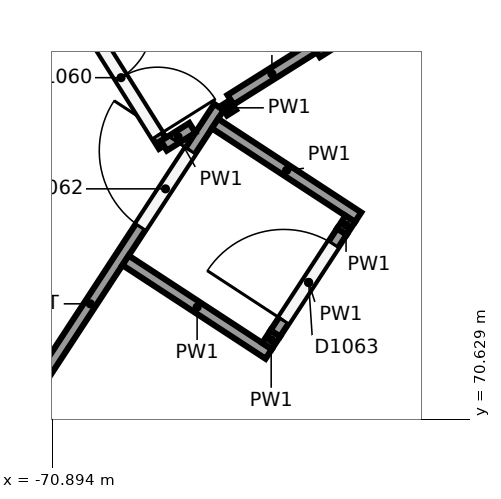
"""IFC4 building model, lengths in metres.
Left out: names, types, materials, properties, quantities, classifications, styles, units other than length and angle.
Written with IfcOpenShell. Run it as: python <this file> out.ifc"""

import sys

from ifc_helpers import new_model, si_unit, direction, frame, frame_2d, origin, place, context, subcontext, project, spatial, rectangle, extrude, element, fill, save


model = new_model("IFC4")
c1 = context("Model", 3, precision=1e-05, world=origin(), true_north=direction((0.0, 1.0)))
c2 = subcontext(c1, "Body", "Model", "MODEL_VIEW")
j1 = project(units=[si_unit("LENGTHUNIT", "METRE"), si_unit("PLANEANGLEUNIT", "RADIAN")], contexts=[c1])
p1 = place(None, origin())
s1 = spatial("IfcSite", under=j1, at=p1, CompositionType="ELEMENT")
p2 = place(p1, origin())
s2 = spatial("IfcBuilding", under=s1, at=p2, CompositionType="ELEMENT")
p3 = place(p2, frame((0.0, 0.0, 12.0)))
s3 = spatial("IfcBuildingStorey", under=s2, at=p3, CompositionType="ELEMENT", Elevation=12.0)
p4 = place(p3, frame((-72.085, 69.559, 0.0), z_axis=(0.0, 0.0, 1.0), x_axis=(0.547328054804, 0.836918156348, 0.0)))
e1 = element("IfcWall", 1, at=p4, inside=s3, PredefinedType="PARTITIONING", context=c2, shape_type="SweptSolid", body=[
    extrude(rectangle(XDim=6.186, YDim=0.15, at=frame_2d((3.093, 0.0))), origin(), (0.0, 0.0, 1.0), 4.026),
])
p5 = place(p4, frame((4.3, 0.0, 0.0)))
e2 = element("IfcOpeningElement", 2, at=p5, cuts=e1, PredefinedType="OPENING", context=c2, shape_type="SweptSolid", body=[
    extrude(rectangle(XDim=1.2, YDim=2.1, at=frame_2d((0.6, 1.05))), frame((0.0, 0.085, 0.0), z_axis=(0.0, -1.0, 0.0), x_axis=(1.0, 0.0, 0.0)), (0.0, 0.0, 1.0), 0.17),
])
p6 = place(p3, frame((-68.548, 74.832, 0.0), z_axis=(0.0, 0.0, 1.0), x_axis=(0.846736781525, 0.53201205138, 0.0)))
e3 = element("IfcWall", 3, at=p6, inside=s3, PredefinedType="PARTITIONING", context=c2, shape_type="SweptSolid", body=[
    extrude(rectangle(XDim=1.285, YDim=0.15, at=frame_2d((0.643, 0.0))), origin(), (0.0, 0.0, 1.0), 4.026),
])
p7 = place(p3, frame((-72.143, 78.552, 0.0), z_axis=(0.0, 0.0, 1.0), x_axis=(0.532063867314, -0.846704222913, 0.0)))
e4 = element("IfcWall", 4, at=p7, inside=s3, PredefinedType="PARTITIONING", context=c2, shape_type="SweptSolid", body=[
    extrude(rectangle(XDim=5.108, YDim=0.15, at=frame_2d((2.554, 0.0))), origin(), (0.0, 0.0, 1.0), 4.55),
])
p8 = place(p7, frame((3.15, 0.0, 0.0)))
e5 = element("IfcOpeningElement", 5, at=p8, cuts=e4, PredefinedType="OPENING", context=c2, shape_type="SweptSolid", body=[
    extrude(rectangle(XDim=1.8, YDim=2.1, at=frame_2d((0.9, 1.05))), frame((0.0, 0.085, 0.0), z_axis=(0.0, -1.0, 0.0), x_axis=(1.0, 0.0, 0.0)), (0.0, 0.0, 1.0), 0.17),
])
p9 = place(p7, frame((0.05, 0.0, 0.0)))
e6 = element("IfcOpeningElement", 6, at=p9, cuts=e4, PredefinedType="OPENING", context=c2, shape_type="SweptSolid", body=[
    extrude(rectangle(XDim=1.8, YDim=2.1, at=frame_2d((0.9, 1.05))), frame((0.0, 0.085, 0.0), z_axis=(0.0, -1.0, 0.0), x_axis=(1.0, 0.0, 0.0)), (0.0, 0.0, 1.0), 0.17),
])
p10 = place(p3, frame((-69.425, 74.227, 0.0), z_axis=(0.0, 0.0, 1.0), x_axis=(0.846757169089, 0.531979601674, 0.0)))
e7 = element("IfcWall", 7, at=p10, inside=s3, PredefinedType="PARTITIONING", context=c2, shape_type="SweptSolid", body=[
    extrude(rectangle(XDim=0.443, YDim=0.15, at=frame_2d((0.221, 0.0))), origin(), (0.0, 0.0, 1.0), 5.65),
])
p11 = place(p3, frame((-68.633, 74.69, 0.0), z_axis=(0.0, 0.0, 1.0), x_axis=(0.845995317019, 0.533190325852, 0.0)))
e8 = element("IfcWall", 8, at=p11, inside=s3, PredefinedType="PARTITIONING", context=c2, shape_type="SweptSolid", body=[
    extrude(rectangle(XDim=0.137, YDim=0.15, at=frame_2d((0.069, 0.0))), origin(), (0.0, 0.0, 1.0), 5.65),
])
p12 = place(p3, frame((-67.411, 75.457, 0.0), z_axis=(0.0, 0.0, 1.0), x_axis=(0.846666992422, 0.532123109762, 0.0)))
e9 = element("IfcWall", 9, at=p12, inside=s3, PredefinedType="PARTITIONING", context=c2, shape_type="SweptSolid", body=[
    extrude(rectangle(XDim=1.445, YDim=0.15, at=frame_2d((0.723, 0.0))), origin(), (0.0, 0.0, 1.0), 4.55),
])
for number, where, z_axis, x_axis in (
    (10, (-69.929, 72.719, 0.0), (0.0, 0.0, 1.0), (0.837, -0.547, 0.0)),
    (11, (-68.752, 74.519, 0.0), (0.0, 0.0, 1.0), (0.837, -0.547, 0.0)),
):
    element("IfcWall", number, at=place(p3, frame(where, z_axis=z_axis, x_axis=x_axis)), inside=s3, PredefinedType="PARTITIONING", context=c2, shape_type="SweptSolid", body=[
        extrude(rectangle(XDim=2.25, YDim=0.15, at=frame_2d((1.125, 0.0))), origin(), (0.0, 0.0, 1.0), 5.65),
    ])
p13 = place(p3, frame((-68.068, 71.592, 0.0), z_axis=(0.0, 0.0, 1.0), x_axis=(0.546788900939, 0.837270504562, 0.0)))
e12 = element("IfcWall", 12, at=p13, inside=s3, PredefinedType="PARTITIONING", context=c2, shape_type="SweptSolid", body=[
    extrude(rectangle(XDim=0.2, YDim=0.15, at=frame_2d((0.1, 0.0))), origin(), (0.0, 0.0, 1.0), 5.65),
])
p14 = place(p3, frame((-67.958, 71.759, 0.0), z_axis=(0.0, 0.0, 1.0), x_axis=(0.547319249347, 0.836923914878, 0.0)))
e13 = element("IfcWall", 13, at=p14, inside=s3, PredefinedType="PARTITIONING", context=c2, shape_type="SweptSolid", body=[
    extrude(rectangle(XDim=1.6, YDim=0.15, at=frame_2d((0.8, 0.0))), origin(), (0.0, 0.0, 1.0), 5.65),
])
p15 = place(p14, frame((0.2, 0.0, 0.0)))
e14 = element("IfcOpeningElement", 14, at=p15, cuts=e13, PredefinedType="OPENING", context=c2, shape_type="SweptSolid", body=[
    extrude(rectangle(XDim=1.2, YDim=2.1, at=frame_2d((0.6, 1.05))), frame((0.0, 0.085, 0.0), z_axis=(0.0, -1.0, 0.0), x_axis=(1.0, 0.0, 0.0)), (0.0, 0.0, 1.0), 0.17),
])
p16 = place(p3, frame((-67.083, 73.098, 0.0), z_axis=(0.0, 0.0, 1.0), x_axis=(0.548202987106, 0.836345314405, 0.0)))
e15 = element("IfcWall", 15, at=p16, inside=s3, PredefinedType="PARTITIONING", context=c2, shape_type="SweptSolid", body=[
    extrude(rectangle(XDim=0.2, YDim=0.15, at=frame_2d((0.1, 0.0))), origin(), (0.0, 0.0, 1.0), 5.65),
])
p17 = place(p5, origin())
e16 = element("IfcDoor", 16, at=p17, inside=s3, OperationType="SINGLE_SWING_RIGHT", PredefinedType="DOOR", context=c2, shape_type="SweptSolid", body=[
    extrude(rectangle(XDim=1.2, YDim=2.1, at=frame_2d((0.6, 1.05))), frame((0.0, 0.025, 0.0), z_axis=(0.0, -1.0, 0.0), x_axis=(1.0, 0.0, 0.0)), (0.0, 0.0, 1.0), 0.05),
])
fill(e2, e16)
p18 = place(p8, origin())
e17 = element("IfcDoor", 17, at=p18, inside=s3, OperationType="DOUBLE_DOOR_SINGLE_SWING", PredefinedType="DOOR", context=c2, shape_type="SweptSolid", body=[
    extrude(rectangle(XDim=1.8, YDim=2.1, at=frame_2d((0.9, 1.05))), frame((0.0, 0.025, 0.0), z_axis=(0.0, -1.0, 0.0), x_axis=(1.0, 0.0, 0.0)), (0.0, 0.0, 1.0), 0.05),
])
fill(e5, e17)
p19 = place(p15, origin())
e18 = element("IfcDoor", 18, at=p19, inside=s3, OperationType="SINGLE_SWING_LEFT", PredefinedType="DOOR", context=c2, shape_type="SweptSolid", body=[
    extrude(rectangle(XDim=1.2, YDim=2.1, at=frame_2d((0.6, 1.05))), frame((0.0, 0.025, 0.0), z_axis=(0.0, -1.0, 0.0), x_axis=(1.0, 0.0, 0.0)), (0.0, 0.0, 1.0), 0.05),
])
fill(e14, e18)
save(model, sys.argv[1])
